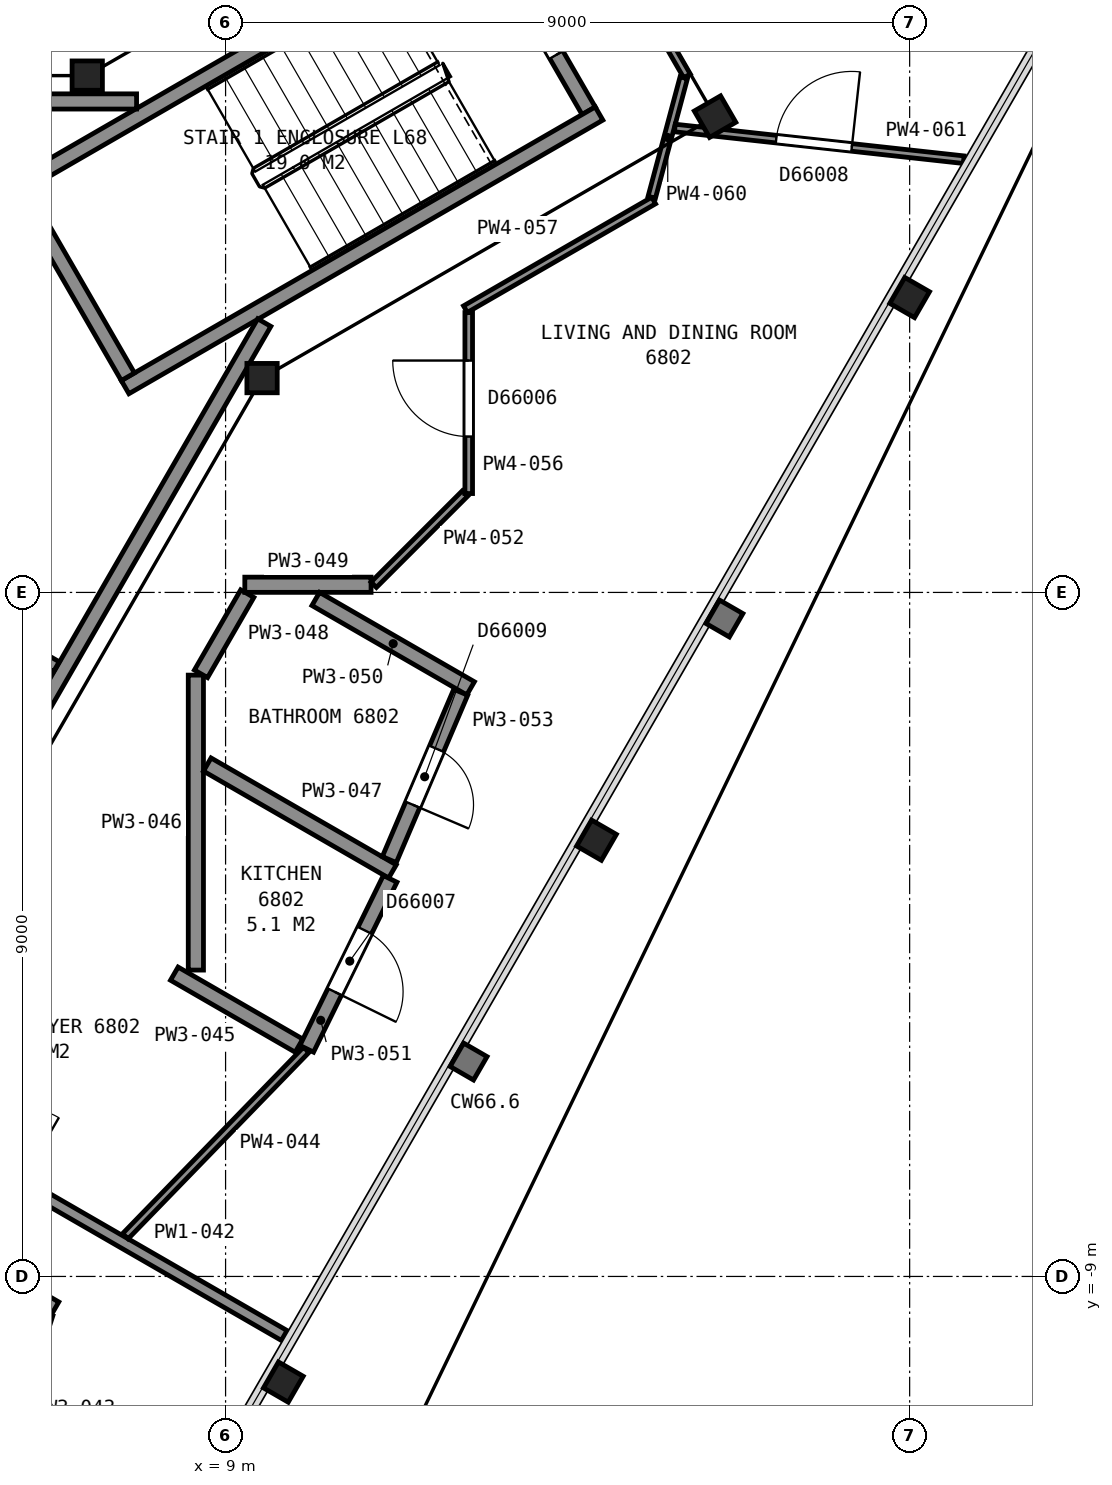
"""IFC4 building model, lengths in metres.
Left out: names, types, materials, properties, quantities, classifications, styles, units other than length and angle.
Written with IfcOpenShell. Run it as: python <this file> out.ifc"""

import sys

from ifc_helpers import new_model, si_unit, direction, frame, frame_2d, origin, origin_2d, place, context, subcontext, project, spatial, rectangle, i_section, extrude, element, fill, save


model = new_model("IFC4")
c1 = context("Model", 3, precision=1e-05, world=origin(), true_north=direction((0.0, 1.0)))
c2 = subcontext(c1, "Body", "Model", "MODEL_VIEW")
j1 = project(units=[si_unit("LENGTHUNIT", "METRE"), si_unit("PLANEANGLEUNIT", "RADIAN")], contexts=[c1])
p1 = place(None, origin())
s1 = spatial("IfcSite", under=j1, at=p1, CompositionType="ELEMENT")
p2 = place(p1, origin())
s2 = spatial("IfcBuilding", under=s1, at=p2, CompositionType="ELEMENT")
p3 = place(p2, frame((0.0, 0.0, 271.4)))
s3 = spatial("IfcBuildingStorey", under=s2, at=p3, CompositionType="ELEMENT", Elevation=271.4)
for number, where, z_axis, x_axis in (
    (1, (9.76, -10.39, 0.0), (0.0, 0.0, 1.0), (-0.5, -0.866, 0.0)),
    (2, (13.88, -3.26, 0.0), (0.0, 0.0, 1.0), (-0.5, -0.866, 0.0)),
    (3, (18.0, 3.88, 0.0), (0.0, 0.0, 1.0), (-0.5, -0.866, 0.0)),
):
    element("IfcColumn", number, at=place(p3, frame(where, z_axis=z_axis, x_axis=x_axis)), inside=s3, PredefinedType="COLUMN", context=c2, shape_type="SweptSolid", body=[
        extrude(i_section(OverallWidth=0.394, OverallDepth=0.376, WebThickness=0.017, FlangeThickness=0.028, FilletRadius=0.015, at=origin_2d()), origin(), (0.0, 0.0, 1.0), 3.7),
    ])
p4 = place(p3, frame((9.48, 2.82, 0.0), z_axis=(0.0, 0.0, 1.0), x_axis=(1.0, 0.0, 0.0)))
e4 = element("IfcColumn", 4, at=p4, inside=s3, PredefinedType="COLUMN", context=c2, shape_type="SweptSolid", body=[
    extrude(i_section(OverallWidth=0.399, OverallDepth=0.386, WebThickness=0.021, FlangeThickness=0.033, FilletRadius=0.015, at=origin_2d()), origin(), (0.0, 0.0, 1.0), 3.7),
])
p5 = place(p3, frame((15.44, 6.26, 0.0), z_axis=(0.0, 0.0, 1.0), x_axis=(0.5, -0.866025403784, 0.0)))
e5 = element("IfcColumn", 5, at=p5, inside=s3, PredefinedType="COLUMN", context=c2, shape_type="SweptSolid", body=[
    extrude(i_section(OverallWidth=0.401, OverallDepth=0.399, WebThickness=0.025, FlangeThickness=0.04, FilletRadius=0.015, at=origin_2d()), origin(), (0.0, 0.0, 1.0), 3.7),
])
p6 = place(p3, frame((7.18, 6.8, 0.0), z_axis=(0.0, 0.0, 1.0), x_axis=(1.0, 0.0, 0.0)))
e6 = element("IfcColumn", 6, at=p6, inside=s3, PredefinedType="COLUMN", context=c2, shape_type="SweptSolid", body=[
    extrude(i_section(OverallWidth=0.399, OverallDepth=0.386, WebThickness=0.021, FlangeThickness=0.033, FilletRadius=0.015, at=origin_2d()), origin(), (0.0, 0.0, 1.0), 3.7),
])
p7 = place(p3, frame((13.777, 6.338, 0.0), z_axis=(0.0, 0.0, 1.0), x_axis=(-0.500049511043, 0.865996816683, 0.0)))
e7 = element("IfcWall", 7, at=p7, inside=s3, PredefinedType="PARTITIONING", context=c2, shape_type="SweptSolid", body=[
    extrude(rectangle(XDim=2.8, YDim=0.2, at=frame_2d((1.4, 0.0))), origin(), (0.0, 0.0, 1.0), 3.45),
])
p8 = place(p7, frame((0.85, 0.0, 0.0)))
e8 = element("IfcOpeningElement", 8, at=p8, cuts=e7, PredefinedType="OPENING", context=c2, shape_type="SweptSolid", body=[
    extrude(rectangle(XDim=1.1, YDim=2.1, at=frame_2d((0.55, 1.05))), frame((0.0, 0.11, 0.0), z_axis=(0.0, -1.0, 0.0), x_axis=(1.0, 0.0, 0.0)), (0.0, 0.0, 1.0), 0.22),
])
for number, where, z_axis, x_axis in (
    (9, (6.178, 5.299, 0.0), (0.0, 0.0, 1.0), (0.866, 0.5, 0.0)),
    (10, (7.678, 2.701, 0.0), (0.0, 0.0, 1.0), (0.866, 0.5, 0.0)),
):
    element("IfcWall", number, at=place(p3, frame(where, z_axis=z_axis, x_axis=x_axis)), inside=s3, PredefinedType="PARTITIONING", context=c2, shape_type="SweptSolid", body=[
        extrude(rectangle(XDim=7.2, YDim=0.2, at=frame_2d((3.6, 0.0))), origin(), (0.0, 0.0, 1.0), 3.45),
    ])
p9 = place(p3, frame((7.715, 2.838, 0.0), z_axis=(0.0, 0.0, 1.0), x_axis=(-0.500049511043, 0.865996816683, 0.0)))
e11 = element("IfcWall", 11, at=p9, inside=s3, PredefinedType="PARTITIONING", context=c2, shape_type="SweptSolid", body=[
    extrude(rectangle(XDim=2.8, YDim=0.2, at=frame_2d((1.4, 0.0))), origin(), (0.0, 0.0, 1.0), 3.45),
])
p10 = place(p3, frame((7.829, 6.46, 0.0), z_axis=(0.0, 0.0, 1.0), x_axis=(-1.0, 0.0, 0.0)))
e12 = element("IfcWall", 12, at=p10, inside=s3, PredefinedType="PARTITIONING", context=c2, shape_type="SweptSolid", body=[
    extrude(rectangle(XDim=15.658, YDim=0.2, at=frame_2d((7.829, 0.0))), origin(), (0.0, 0.0, 1.0), 3.45),
])
p11 = place(p10, frame((12.168, 0.0, 0.0)))
e13 = element("IfcOpeningElement", 13, at=p11, cuts=e12, PredefinedType="OPENING", context=c2, shape_type="SweptSolid", body=[
    extrude(rectangle(XDim=1.2, YDim=2.1, at=frame_2d((0.6, 1.05))), frame((0.0, 0.11, 0.0), z_axis=(0.0, -1.0, 0.0), x_axis=(1.0, 0.0, 0.0)), (0.0, 0.0, 1.0), 0.22),
])
p12 = place(p3, frame((3.828, -6.29, 0.0), z_axis=(0.0, 0.0, 1.0), x_axis=(0.499979739078, 0.866037101117, 0.0)))
e14 = element("IfcWall", 14, at=p12, inside=s3, PredefinedType="PARTITIONING", context=c2, shape_type="SweptSolid", body=[
    extrude(rectangle(XDim=11.363, YDim=0.2, at=frame_2d((5.681, 0.0))), origin(), (0.0, 0.0, 1.0), 3.45),
])
p13 = place(p12, frame((0.55, 0.0, 0.0)))
e15 = element("IfcOpeningElement", 15, at=p13, cuts=e14, PredefinedType="OPENING", context=c2, shape_type="SweptSolid", body=[
    extrude(rectangle(XDim=1.2, YDim=2.1, at=frame_2d((0.6, 1.05))), frame((0.0, 0.11, 0.0), z_axis=(0.0, -1.0, 0.0), x_axis=(1.0, 0.0, 0.0)), (0.0, 0.0, 1.0), 0.22),
])
p14 = place(p3, frame((6.774, -0.978, 0.0), z_axis=(0.0, 0.0, 1.0), x_axis=(-0.866062920605, 0.499935013329, 0.0)))
e16 = element("IfcWall", 16, at=p14, inside=s3, PredefinedType="PARTITIONING", context=c2, shape_type="SweptSolid", body=[
    extrude(rectangle(XDim=2.22, YDim=0.15, at=frame_2d((1.11, 0.0))), origin(), (0.0, 0.0, 1.0), 3.45),
])
p15 = place(p14, frame((0.646, 0.0, 0.0)))
e17 = element("IfcOpeningElement", 17, at=p15, cuts=e16, PredefinedType="OPENING", context=c2, shape_type="SweptSolid", body=[
    extrude(rectangle(XDim=0.9, YDim=2.1, at=frame_2d((0.45, 1.05))), frame((0.0, 0.085, 0.0), z_axis=(0.0, -1.0, 0.0), x_axis=(1.0, 0.0, 0.0)), (0.0, 0.0, 1.0), 0.17),
])
p16 = place(p3, frame((3.498, -7.541, 0.0), z_axis=(0.0, 0.0, 1.0), x_axis=(0.865985624761, -0.500068892961, 0.0)))
e18 = element("IfcWall", 18, at=p16, inside=s3, PredefinedType="PARTITIONING", context=c2, shape_type="SweptSolid", body=[
    extrude(rectangle(XDim=3.762, YDim=0.2, at=frame_2d((1.881, 0.0))), origin(), (0.0, 0.0, 1.0), 2.723),
])
p17 = place(p3, frame((9.772, -9.777, 0.0), z_axis=(0.0, 0.0, 1.0), x_axis=(-0.866083818164, 0.499898809675, 0.0)))
e19 = element("IfcWall", 19, at=p17, inside=s3, PredefinedType="PARTITIONING", context=c2, shape_type="SweptSolid", body=[
    extrude(rectangle(XDim=6.551, YDim=0.15, at=frame_2d((3.275, 0.0))), origin(), (0.0, 0.0, 1.0), 2.723),
])
p18 = place(p17, frame((4.001, 0.0, 0.0)))
e20 = element("IfcOpeningElement", 20, at=p18, cuts=e19, PredefinedType="OPENING", context=c2, shape_type="SweptSolid", body=[
    extrude(rectangle(XDim=1.0, YDim=2.1, at=frame_2d((0.5, 1.05))), frame((0.0, 0.085, 0.0), z_axis=(0.0, -1.0, 0.0), x_axis=(1.0, 0.0, 0.0)), (0.0, 0.0, 1.0), 0.17),
])
p19 = place(p3, frame((5.824, -11.999, 0.0), z_axis=(0.0, 0.0, 1.0), x_axis=(0.306054089199, 0.95201412515, 0.0)))
e21 = element("IfcWall", 21, at=p19, inside=s3, PredefinedType="PARTITIONING", context=c2, shape_type="SweptSolid", body=[
    extrude(rectangle(XDim=2.64, YDim=0.2, at=frame_2d((1.32, 0.0))), origin(), (0.0, 0.0, 1.0), 2.723),
])
p20 = place(p3, frame((7.682, -8.47, 0.0), z_axis=(0.0, 0.0, 1.0), x_axis=(0.696344433623, 0.717707760696, 0.0)))
e22 = element("IfcWall", 22, at=p20, inside=s3, PredefinedType="PARTITIONING", context=c2, shape_type="SweptSolid", body=[
    extrude(rectangle(XDim=3.417, YDim=0.1, at=frame_2d((1.708, 0.0))), origin(), (0.0, 0.0, 1.0), 2.723),
])
p21 = place(p3, frame((8.325, -5.016, 0.0), z_axis=(0.0, 0.0, 1.0), x_axis=(0.866093293964, -0.499882392319, 0.0)))
e23 = element("IfcWall", 23, at=p21, inside=s3, PredefinedType="PARTITIONING", context=c2, shape_type="SweptSolid", body=[
    extrude(rectangle(XDim=1.894, YDim=0.2, at=frame_2d((0.947, 0.0))), origin(), (0.0, 0.0, 1.0), 2.723),
])
p22 = place(p3, frame((8.609, -4.969, 0.0), z_axis=(0.0, 0.0, 1.0), x_axis=(0.0, 1.0, 0.0)))
e24 = element("IfcWall", 24, at=p22, inside=s3, PredefinedType="PARTITIONING", context=c2, shape_type="SweptSolid", body=[
    extrude(rectangle(XDim=3.881, YDim=0.2, at=frame_2d((1.94, 0.0))), origin(), (0.0, 0.0, 1.0), 2.723),
])
p23 = place(p3, frame((8.759, -2.265, 0.0), z_axis=(0.0, 0.0, 1.0), x_axis=(0.866098885879, -0.499872703674, 0.0)))
e25 = element("IfcWall", 25, at=p23, inside=s3, PredefinedType="PARTITIONING", context=c2, shape_type="SweptSolid", body=[
    extrude(rectangle(XDim=2.813, YDim=0.2, at=frame_2d((1.407, 0.0))), origin(), (0.0, 0.0, 1.0), 2.723),
])
p24 = place(p3, frame((8.677, -1.071, 0.0), z_axis=(0.0, 0.0, 1.0), x_axis=(0.499803412959, 0.86613887362, 0.0)))
e26 = element("IfcWall", 26, at=p24, inside=s3, PredefinedType="PARTITIONING", context=c2, shape_type="SweptSolid", body=[
    extrude(rectangle(XDim=1.218, YDim=0.2, at=frame_2d((0.609, 0.0))), origin(), (0.0, 0.0, 1.0), 2.723),
])
p25 = place(p3, frame((9.253, 0.101, 0.0), z_axis=(0.0, 0.0, 1.0), x_axis=(1.0, 0.0, 0.0)))
e27 = element("IfcWall", 27, at=p25, inside=s3, PredefinedType="PARTITIONING", context=c2, shape_type="SweptSolid", body=[
    extrude(rectangle(XDim=1.661, YDim=0.2, at=frame_2d((0.831, 0.0))), origin(), (0.0, 0.0, 1.0), 2.723),
])
p26 = place(p3, frame((10.186, -0.086, 0.0), z_axis=(0.0, 0.0, 1.0), x_axis=(0.866024864377, -0.50000093428, 0.0)))
e28 = element("IfcWall", 28, at=p26, inside=s3, PredefinedType="PARTITIONING", context=c2, shape_type="SweptSolid", body=[
    extrude(rectangle(XDim=2.353, YDim=0.2, at=frame_2d((1.176, 0.0))), origin(), (0.0, 0.0, 1.0), 2.723),
])
p27 = place(p3, frame((10.068, -6.005, 0.0), z_axis=(0.0, 0.0, 1.0), x_axis=(0.440614307878, 0.897696514248, 0.0)))
e29 = element("IfcWall", 29, at=p27, inside=s3, PredefinedType="PARTITIONING", context=c2, shape_type="SweptSolid", body=[
    extrude(rectangle(XDim=2.491, YDim=0.2, at=frame_2d((1.245, 0.0))), origin(), (0.0, 0.0, 1.0), 2.723),
])
p28 = place(p27, frame((0.835, 0.0, 0.0)))
e30 = element("IfcOpeningElement", 30, at=p28, cuts=e29, PredefinedType="OPENING", context=c2, shape_type="SweptSolid", body=[
    extrude(rectangle(XDim=0.9, YDim=2.1, at=frame_2d((0.45, 1.05))), frame((0.0, 0.11, 0.0), z_axis=(0.0, -1.0, 0.0), x_axis=(1.0, 0.0, 0.0)), (0.0, 0.0, 1.0), 0.22),
])
p29 = place(p3, frame((10.949, 0.101, 0.0), z_axis=(0.0, 0.0, 1.0), x_axis=(0.707106781187, 0.707106781187, 0.0)))
e31 = element("IfcWall", 31, at=p29, inside=s3, PredefinedType="PARTITIONING", context=c2, shape_type="SweptSolid", body=[
    extrude(rectangle(XDim=1.698, YDim=0.1, at=frame_2d((0.849, 0.0))), origin(), (0.0, 0.0, 1.0), 2.723),
])
p30 = place(p3, frame((11.154, -3.515, 0.0), z_axis=(0.0, 0.0, 1.0), x_axis=(0.392515754301, 0.919745281383, 0.0)))
e32 = element("IfcWall", 32, at=p30, inside=s3, PredefinedType="PARTITIONING", context=c2, shape_type="SweptSolid", body=[
    extrude(rectangle(XDim=2.394, YDim=0.2, at=frame_2d((1.197, 0.0))), origin(), (0.0, 0.0, 1.0), 2.723),
])
p31 = place(p30, frame((0.785, 0.0, 0.0)))
e33 = element("IfcOpeningElement", 33, at=p31, cuts=e32, PredefinedType="OPENING", context=c2, shape_type="SweptSolid", body=[
    extrude(rectangle(XDim=0.8, YDim=2.1, at=frame_2d((0.4, 1.05))), frame((0.0, 0.11, 0.0), z_axis=(0.0, -1.0, 0.0), x_axis=(1.0, 0.0, 0.0)), (0.0, 0.0, 1.0), 0.22),
])
p32 = place(p3, frame((12.199, 3.682, 0.0), z_axis=(0.0, 0.0, 1.0), x_axis=(0.0, -1.0, 0.0)))
e34 = element("IfcWall", 34, at=p32, inside=s3, PredefinedType="PARTITIONING", context=c2, shape_type="SweptSolid", body=[
    extrude(rectangle(XDim=2.381, YDim=0.1, at=frame_2d((1.19, 0.0))), origin(), (0.0, 0.0, 1.0), 2.723),
])
p33 = place(p32, frame((0.631, 0.0, 0.0)))
e35 = element("IfcOpeningElement", 35, at=p33, cuts=e34, PredefinedType="OPENING", context=c2, shape_type="SweptSolid", body=[
    extrude(rectangle(XDim=1.0, YDim=2.1, at=frame_2d((0.5, 1.05))), frame((0.0, 0.06, 0.0), z_axis=(0.0, -1.0, 0.0), x_axis=(1.0, 0.0, 0.0)), (0.0, 0.0, 1.0), 0.12),
])
p34 = place(p3, frame((12.156, 3.727, 0.0), z_axis=(0.0, 0.0, 1.0), x_axis=(0.866012137121, 0.500022977831, 0.0)))
e36 = element("IfcWall", 36, at=p34, inside=s3, PredefinedType="PARTITIONING", context=c2, shape_type="SweptSolid", body=[
    extrude(rectangle(XDim=2.86, YDim=0.1, at=frame_2d((1.43, 0.0))), origin(), (0.0, 0.0, 1.0), 2.723),
])
p35 = place(p3, frame((13.771, 9.047, 0.0), z_axis=(0.0, 0.0, 1.0), x_axis=(0.500006934395, -0.866021400173, 0.0)))
e37 = element("IfcWall", 37, at=p35, inside=s3, PredefinedType="PARTITIONING", context=c2, shape_type="SweptSolid", body=[
    extrude(rectangle(XDim=2.6, YDim=0.1, at=frame_2d((1.3, 0.0))), origin(), (0.0, 0.0, 1.0), 2.723),
])
p36 = place(p3, frame((14.607, 5.2, 0.0), z_axis=(0.0, 0.0, 1.0), x_axis=(0.258531076101, 0.966002941346, 0.0)))
e38 = element("IfcWall", 38, at=p36, inside=s3, PredefinedType="PARTITIONING", context=c2, shape_type="SweptSolid", body=[
    extrude(rectangle(XDim=1.627, YDim=0.1, at=frame_2d((0.813, 0.0))), origin(), (0.0, 0.0, 1.0), 2.723),
])
p37 = place(p3, frame((14.911, 6.111, 0.0), z_axis=(0.0, 0.0, 1.0), x_axis=(0.994040808037, -0.10900858662, 0.0)))
e39 = element("IfcWall", 39, at=p37, inside=s3, PredefinedType="PARTITIONING", context=c2, shape_type="SweptSolid", body=[
    extrude(rectangle(XDim=3.823, YDim=0.1, at=frame_2d((1.912, 0.0))), origin(), (0.0, 0.0, 1.0), 2.723),
])
p38 = place(p37, frame((1.342, 0.0, 0.0)))
e40 = element("IfcOpeningElement", 40, at=p38, cuts=e39, PredefinedType="OPENING", context=c2, shape_type="SweptSolid", body=[
    extrude(rectangle(XDim=1.0, YDim=2.1, at=frame_2d((0.5, 1.05))), frame((0.0, 0.06, 0.0), z_axis=(0.0, -1.0, 0.0), x_axis=(1.0, 0.0, 0.0)), (0.0, 0.0, 1.0), 0.12),
])
p39 = place(p8, origin())
e41 = element("IfcDoor", 41, at=p39, inside=s3, OperationType="SINGLE_SWING_LEFT", PredefinedType="DOOR", context=c2, shape_type="SweptSolid", body=[
    extrude(rectangle(XDim=1.1, YDim=2.1, at=frame_2d((0.55, 1.05))), frame((0.0, 0.025, 0.0), z_axis=(0.0, -1.0, 0.0), x_axis=(1.0, 0.0, 0.0)), (0.0, 0.0, 1.0), 0.05),
])
fill(e8, e41)
p40 = place(p28, origin())
e42 = element("IfcDoor", 42, at=p40, inside=s3, OperationType="SINGLE_SWING_LEFT", PredefinedType="DOOR", context=c2, shape_type="SweptSolid", body=[
    extrude(rectangle(XDim=0.9, YDim=2.1, at=frame_2d((0.45, 1.05))), frame((0.0, 0.025, 0.0), z_axis=(0.0, -1.0, 0.0), x_axis=(1.0, 0.0, 0.0)), (0.0, 0.0, 1.0), 0.05),
])
fill(e30, e42)
p41 = place(p31, origin())
e43 = element("IfcDoor", 43, at=p41, inside=s3, OperationType="SINGLE_SWING_LEFT", PredefinedType="DOOR", context=c2, shape_type="SweptSolid", body=[
    extrude(rectangle(XDim=0.8, YDim=2.1, at=frame_2d((0.4, 1.05))), frame((0.0, 0.025, 0.0), z_axis=(0.0, -1.0, 0.0), x_axis=(1.0, 0.0, 0.0)), (0.0, 0.0, 1.0), 0.05),
])
fill(e33, e43)
p42 = place(p33, origin())
e44 = element("IfcDoor", 44, at=p42, inside=s3, OperationType="SINGLE_SWING_LEFT", PredefinedType="DOOR", context=c2, shape_type="SweptSolid", body=[
    extrude(rectangle(XDim=1.0, YDim=2.1, at=frame_2d((0.5, 1.05))), frame((0.0, 0.025, 0.0), z_axis=(0.0, -1.0, 0.0), x_axis=(1.0, 0.0, 0.0)), (0.0, 0.0, 1.0), 0.05),
])
fill(e35, e44)
p43 = place(p38, origin())
e45 = element("IfcDoor", 45, at=p43, inside=s3, OperationType="SINGLE_SWING_RIGHT", PredefinedType="DOOR", context=c2, shape_type="SweptSolid", body=[
    extrude(rectangle(XDim=1.0, YDim=2.1, at=frame_2d((0.5, 1.05))), frame((0.0, 0.025, 0.0), z_axis=(0.0, -1.0, 0.0), x_axis=(1.0, 0.0, 0.0)), (0.0, 0.0, 1.0), 0.05),
])
fill(e40, e45)
save(model, sys.argv[1])
